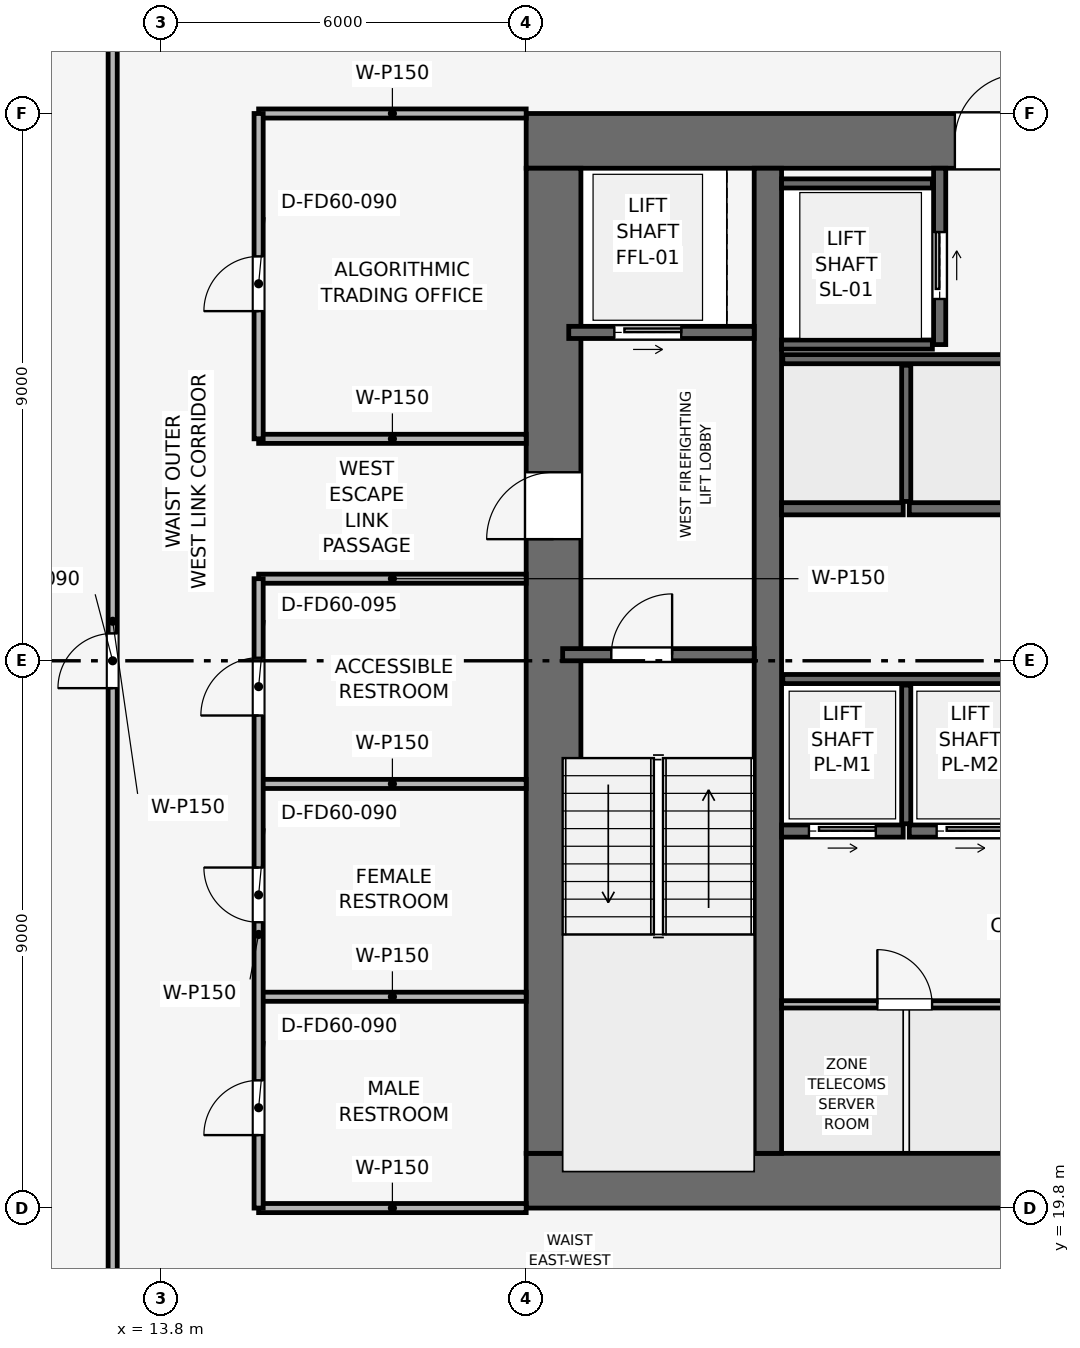
"""IFC4 building model, lengths in metres.
Left out: names, types, materials, properties, quantities, classifications, styles, units other than length and angle.
Written with IfcOpenShell. Run it as: python <this file> out.ifc"""

import sys

from ifc_helpers import new_model, si_unit, direction, frame, frame_2d, origin, place, context, subcontext, project, spatial, rectangle, extrude, element, fill, save


model = new_model("IFC4")
c1 = context("Model", 3, precision=1e-05, world=origin(), true_north=direction((0.0, 1.0)))
c2 = subcontext(c1, "Body", "Model", "MODEL_VIEW")
j1 = project(units=[si_unit("LENGTHUNIT", "METRE"), si_unit("PLANEANGLEUNIT", "RADIAN")], contexts=[c1])
p1 = place(None, origin())
s1 = spatial("IfcSite", under=j1, at=p1, CompositionType="ELEMENT")
p2 = place(p1, origin())
s2 = spatial("IfcBuilding", under=s1, at=p2, CompositionType="ELEMENT")
p3 = place(p2, frame((0.0, 0.0, 157.05)))
s3 = spatial("IfcBuildingStorey", under=s2, at=p3, CompositionType="ELEMENT", Elevation=157.05)
p4 = place(p3, frame((19.8, 20.25, 0.0), z_axis=(0.0, 0.0, 1.0), x_axis=(1.0, 0.0, 0.0)))
e1 = element("IfcWall", 1, at=p4, inside=s3, PredefinedType="SHEAR", context=c2, shape_type="SweptSolid", body=[
    extrude(rectangle(XDim=18.0, YDim=0.9, at=frame_2d((9.0, 0.0))), origin(), (0.0, 0.0, 1.0), 3.75),
])
p5 = place(p4, frame((8.4, 0.0, 0.0)))
e2 = element("IfcOpeningElement", 2, at=p5, cuts=e1, PredefinedType="OPENING", context=c2, shape_type="SweptSolid", body=[
    extrude(rectangle(XDim=1.2, YDim=2.2, at=frame_2d((0.6, 1.1))), frame((0.0, 0.46, 0.0), z_axis=(0.0, -1.0, 0.0), x_axis=(1.0, 0.0, 0.0)), (0.0, 0.0, 1.0), 0.92),
])
p6 = place(p3, frame((19.8, 37.35, 0.0), z_axis=(0.0, 0.0, 1.0), x_axis=(1.0, 0.0, 0.0)))
e3 = element("IfcWall", 3, at=p6, inside=s3, PredefinedType="SHEAR", context=c2, shape_type="SweptSolid", body=[
    extrude(rectangle(XDim=18.0, YDim=0.9, at=frame_2d((9.0, 0.0))), origin(), (0.0, 0.0, 1.0), 3.75),
])
p7 = place(p6, frame((7.05, 0.0, 0.0)))
e4 = element("IfcOpeningElement", 4, at=p7, cuts=e3, PredefinedType="OPENING", context=c2, shape_type="SweptSolid", body=[
    extrude(rectangle(XDim=1.1, YDim=2.15, at=frame_2d((0.55, 1.075))), frame((0.0, 0.46, 0.0), z_axis=(0.0, -1.0, 0.0), x_axis=(1.0, 0.0, 0.0)), (0.0, 0.0, 1.0), 0.92),
])
p8 = place(p3, frame((20.25, 20.7, 0.0), z_axis=(0.0, 0.0, 1.0), x_axis=(0.0, 1.0, 0.0)))
e5 = element("IfcWall", 5, at=p8, inside=s3, PredefinedType="SHEAR", context=c2, shape_type="SweptSolid", body=[
    extrude(rectangle(XDim=16.2, YDim=0.9, at=frame_2d((8.1, 0.0))), origin(), (0.0, 0.0, 1.0), 3.75),
])
p9 = place(p8, frame((10.1, 0.0, 0.0)))
e6 = element("IfcOpeningElement", 6, at=p9, cuts=e5, PredefinedType="OPENING", context=c2, shape_type="SweptSolid", body=[
    extrude(rectangle(XDim=1.1, YDim=2.15, at=frame_2d((0.55, 1.075))), frame((0.0, 0.46, 0.0), z_axis=(0.0, -1.0, 0.0), x_axis=(1.0, 0.0, 0.0)), (0.0, 0.0, 1.0), 0.92),
])
p10 = place(p3, frame((23.775, 20.7, 0.0), z_axis=(0.0, 0.0, 1.0), x_axis=(0.0, 1.0, 0.0)))
e7 = element("IfcWall", 7, at=p10, inside=s3, PredefinedType="SHEAR", context=c2, shape_type="SweptSolid", body=[
    extrude(rectangle(XDim=16.2, YDim=0.45, at=frame_2d((8.1, 0.0))), origin(), (0.0, 0.0, 1.0), 3.75),
])
p11 = place(p3, frame((20.4, 28.9, 0.0), z_axis=(0.0, 0.0, 1.0), x_axis=(1.0, 0.0, 0.0)))
e8 = element("IfcWall", 8, at=p11, inside=s3, PredefinedType="SHEAR", context=c2, shape_type="SweptSolid", body=[
    extrude(rectangle(XDim=3.15, YDim=0.2, at=frame_2d((1.575, 0.0))), origin(), (0.0, 0.0, 1.0), 3.495),
])
p12 = place(p11, frame((0.8, 0.0, 0.0)))
e9 = element("IfcOpeningElement", 9, at=p12, cuts=e8, PredefinedType="OPENING", context=c2, shape_type="SweptSolid", body=[
    extrude(rectangle(XDim=1.0, YDim=2.1, at=frame_2d((0.5, 1.05))), frame((0.0, 0.11, 0.0), z_axis=(0.0, -1.0, 0.0), x_axis=(1.0, 0.0, 0.0)), (0.0, 0.0, 1.0), 0.22),
])
p13 = place(p3, frame((20.5, 34.2, 0.0), z_axis=(0.0, 0.0, 1.0), x_axis=(1.0, 0.0, 0.0)))
e10 = element("IfcWall", 10, at=p13, inside=s3, PredefinedType="SHEAR", context=c2, shape_type="SweptSolid", body=[
    extrude(rectangle(XDim=3.05, YDim=0.2, at=frame_2d((1.525, 0.0))), origin(), (0.0, 0.0, 1.0), 3.495),
])
p14 = place(p13, frame((0.75, 0.0, 0.0)))
e11 = element("IfcOpeningElement", 11, at=p14, cuts=e10, PredefinedType="OPENING", context=c2, shape_type="SweptSolid", body=[
    extrude(rectangle(XDim=1.1, YDim=2.15, at=frame_2d((0.55, 1.075))), frame((0.0, 0.11, 0.0), z_axis=(0.0, -1.0, 0.0), x_axis=(1.0, 0.0, 0.0)), (0.0, 0.0, 1.0), 0.22),
])
p15 = place(p3, frame((26.6, 34.0, 0.0), z_axis=(0.0, 0.0, 1.0), x_axis=(0.0, 1.0, 0.0)))
e12 = element("IfcWall", 12, at=p15, inside=s3, PredefinedType="SHEAR", context=c2, shape_type="SweptSolid", body=[
    extrude(rectangle(XDim=2.9, YDim=0.2, at=frame_2d((1.45, 0.0))), origin(), (0.0, 0.0, 1.0), 3.495),
])
p16 = place(p15, frame((0.75, 0.0, 0.0)))
e13 = element("IfcOpeningElement", 13, at=p16, cuts=e12, PredefinedType="OPENING", context=c2, shape_type="SweptSolid", body=[
    extrude(rectangle(XDim=1.1, YDim=2.15, at=frame_2d((0.55, 1.075))), frame((0.0, 0.11, 0.0), z_axis=(0.0, -1.0, 0.0), x_axis=(1.0, 0.0, 0.0)), (0.0, 0.0, 1.0), 0.22),
])
for number, where, z_axis, x_axis in (
    (14, (24.0, 34.0, 0.0), (0.0, 0.0, 1.0), (1.0, 0.0, 0.0)),
    (15, (24.0, 36.65, 0.0), (0.0, 0.0, 1.0), (1.0, 0.0, 0.0)),
):
    element("IfcWall", number, at=place(p3, frame(where, z_axis=z_axis, x_axis=x_axis)), inside=s3, PredefinedType="SHEAR", context=c2, shape_type="SweptSolid", body=[
        extrude(rectangle(XDim=2.48, YDim=0.15, at=frame_2d((1.24, 0.0))), origin(), (0.0, 0.0, 1.0), 3.495),
    ])
p17 = place(p3, frame((24.0, 26.0, 0.0), z_axis=(0.0, 0.0, 1.0), x_axis=(1.0, 0.0, 0.0)))
e16 = element("IfcWall", 16, at=p17, inside=s3, PredefinedType="SHEAR", context=c2, shape_type="SweptSolid", body=[
    extrude(rectangle(XDim=2.0, YDim=0.2, at=frame_2d((1.0, 0.0))), origin(), (0.0, 0.0, 1.0), 3.495),
])
p18 = place(p17, frame((0.45, 0.0, 0.0)))
e17 = element("IfcOpeningElement", 17, at=p18, cuts=e16, PredefinedType="OPENING", context=c2, shape_type="SweptSolid", body=[
    extrude(rectangle(XDim=1.1, YDim=2.15, at=frame_2d((0.55, 1.075))), frame((0.0, 0.11, 0.0), z_axis=(0.0, -1.0, 0.0), x_axis=(1.0, 0.0, 0.0)), (0.0, 0.0, 1.0), 0.22),
])
p19 = place(p3, frame((26.1, 26.0, 0.0), z_axis=(0.0, 0.0, 1.0), x_axis=(1.0, 0.0, 0.0)))
e18 = element("IfcWall", 18, at=p19, inside=s3, PredefinedType="SHEAR", context=c2, shape_type="SweptSolid", body=[
    extrude(rectangle(XDim=2.0, YDim=0.2, at=frame_2d((1.0, 0.0))), origin(), (0.0, 0.0, 1.0), 3.495),
])
p20 = place(p19, frame((0.45, 0.0, 0.0)))
e19 = element("IfcOpeningElement", 19, at=p20, cuts=e18, PredefinedType="OPENING", context=c2, shape_type="SweptSolid", body=[
    extrude(rectangle(XDim=1.1, YDim=2.15, at=frame_2d((0.55, 1.075))), frame((0.0, 0.11, 0.0), z_axis=(0.0, -1.0, 0.0), x_axis=(1.0, 0.0, 0.0)), (0.0, 0.0, 1.0), 0.22),
])
for number, where, z_axis, x_axis in (
    (20, (24.0, 31.3, 0.0), (0.0, 0.0, 1.0), (1.0, 0.0, 0.0)),
    (21, (26.1, 31.3, 0.0), (0.0, 0.0, 1.0), (1.0, 0.0, 0.0)),
):
    element("IfcWall", number, at=place(p3, frame(where, z_axis=z_axis, x_axis=x_axis)), inside=s3, PredefinedType="SHEAR", context=c2, shape_type="SweptSolid", body=[
        extrude(rectangle(XDim=2.0, YDim=0.2, at=frame_2d((1.0, 0.0))), origin(), (0.0, 0.0, 1.0), 3.495),
    ])
p21 = place(p3, frame((24.02, 28.5, 0.0), z_axis=(0.0, 0.0, 1.0), x_axis=(1.0, 0.0, 0.0)))
e22 = element("IfcWall", 22, at=p21, inside=s3, PredefinedType="SHEAR", context=c2, shape_type="SweptSolid", body=[
    extrude(rectangle(XDim=4.08, YDim=0.15, at=frame_2d((2.04, 0.0))), origin(), (0.0, 0.0, 1.0), 3.495),
])
p22 = place(p3, frame((26.05, 26.12, 0.0), z_axis=(0.0, 0.0, 1.0), x_axis=(0.0, 1.0, 0.0)))
e23 = element("IfcWall", 23, at=p22, inside=s3, PredefinedType="SHEAR", context=c2, shape_type="SweptSolid", body=[
    extrude(rectangle(XDim=2.28, YDim=0.15, at=frame_2d((1.14, 0.0))), origin(), (0.0, 0.0, 1.0), 3.495),
])
p23 = place(p3, frame((24.02, 33.76, 0.0), z_axis=(0.0, 0.0, 1.0), x_axis=(1.0, 0.0, 0.0)))
e24 = element("IfcWall", 24, at=p23, inside=s3, PredefinedType="SHEAR", context=c2, shape_type="SweptSolid", body=[
    extrude(rectangle(XDim=4.08, YDim=0.15, at=frame_2d((2.04, 0.0))), origin(), (0.0, 0.0, 1.0), 3.495),
])
p24 = place(p3, frame((26.05, 31.42, 0.0), z_axis=(0.0, 0.0, 1.0), x_axis=(0.0, 1.0, 0.0)))
e25 = element("IfcWall", 25, at=p24, inside=s3, PredefinedType="SHEAR", context=c2, shape_type="SweptSolid", body=[
    extrude(rectangle(XDim=2.24, YDim=0.15, at=frame_2d((1.12, 0.0))), origin(), (0.0, 0.0, 1.0), 3.495),
])
p25 = place(p3, frame((24.0, 23.15, 0.0), z_axis=(0.0, 0.0, 1.0), x_axis=(1.0, 0.0, 0.0)))
e26 = element("IfcWall", 26, at=p25, inside=s3, PredefinedType="PARTITIONING", context=c2, shape_type="SweptSolid", body=[
    extrude(rectangle(XDim=4.05, YDim=0.12, at=frame_2d((2.025, 0.0))), origin(), (0.0, 0.0, 1.0), 3.495),
])
p26 = place(p25, frame((1.575, 0.0, 0.0)))
e27 = element("IfcOpeningElement", 27, at=p26, cuts=e26, PredefinedType="OPENING", context=c2, shape_type="SweptSolid", body=[
    extrude(rectangle(XDim=0.9, YDim=2.1, at=frame_2d((0.45, 1.05))), frame((0.0, 0.07, 0.0), z_axis=(0.0, -1.0, 0.0), x_axis=(1.0, 0.0, 0.0)), (0.0, 0.0, 1.0), 0.14),
])
p27 = place(p3, frame((15.4, 19.8, 0.0), z_axis=(0.0, 0.0, 1.0), x_axis=(1.0, 0.0, 0.0)))
e28 = element("IfcWall", 28, at=p27, inside=s3, PredefinedType="PARTITIONING", context=c2, shape_type="SweptSolid", body=[
    extrude(rectangle(XDim=4.4, YDim=0.15, at=frame_2d((2.2, 0.0))), origin(), (0.0, 0.0, 1.0), 3.03),
])
for number, where, z_axis, x_axis in (
    (29, (15.4, 23.275, 0.0), (0.0, 0.0, 1.0), (1.0, 0.0, 0.0)),
    (30, (15.4, 26.775, 0.0), (0.0, 0.0, 1.0), (1.0, 0.0, 0.0)),
    (31, (15.4, 30.15, 0.0), (0.0, 0.0, 1.0), (1.0, 0.0, 0.0)),
    (32, (15.4, 32.45, 0.0), (0.0, 0.0, 1.0), (1.0, 0.0, 0.0)),
):
    element("IfcWall", number, at=place(p3, frame(where, z_axis=z_axis, x_axis=x_axis)), inside=s3, PredefinedType="PARTITIONING", context=c2, shape_type="SweptSolid", body=[
        extrude(rectangle(XDim=4.4, YDim=0.15, at=frame_2d((2.2, 0.0))), origin(), (0.0, 0.0, 1.0), 3.495),
    ])
p28 = place(p3, frame((15.4, 37.8, 0.0), z_axis=(0.0, 0.0, 1.0), x_axis=(1.0, 0.0, 0.0)))
e33 = element("IfcWall", 33, at=p28, inside=s3, PredefinedType="PARTITIONING", context=c2, shape_type="SweptSolid", body=[
    extrude(rectangle(XDim=4.4, YDim=0.15, at=frame_2d((2.2, 0.0))), origin(), (0.0, 0.0, 1.0), 3.03),
])
p29 = place(p3, frame((15.4, 19.8, 0.0), z_axis=(0.0, 0.0, 1.0), x_axis=(0.0, 1.0, 0.0)))
e34 = element("IfcWall", 34, at=p29, inside=s3, PredefinedType="PARTITIONING", context=c2, shape_type="SweptSolid", body=[
    extrude(rectangle(XDim=10.35, YDim=0.15, at=frame_2d((5.175, 0.0))), origin(), (0.0, 0.0, 1.0), 3.03),
])
p30 = place(p29, frame((1.2, 0.0, 0.0)))
e35 = element("IfcOpeningElement", 35, at=p30, cuts=e34, PredefinedType="OPENING", context=c2, shape_type="SweptSolid", body=[
    extrude(rectangle(XDim=0.9, YDim=2.1, at=frame_2d((0.45, 1.05))), frame((0.0, 0.085, 0.0), z_axis=(0.0, -1.0, 0.0), x_axis=(1.0, 0.0, 0.0)), (0.0, 0.0, 1.0), 0.17),
])
p31 = place(p29, frame((4.7, 0.0, 0.0)))
e36 = element("IfcOpeningElement", 36, at=p31, cuts=e34, PredefinedType="OPENING", context=c2, shape_type="SweptSolid", body=[
    extrude(rectangle(XDim=0.9, YDim=2.1, at=frame_2d((0.45, 1.05))), frame((0.0, 0.085, 0.0), z_axis=(0.0, -1.0, 0.0), x_axis=(1.0, 0.0, 0.0)), (0.0, 0.0, 1.0), 0.17),
])
p32 = place(p29, frame((8.1, 0.0, 0.0)))
e37 = element("IfcOpeningElement", 37, at=p32, cuts=e34, PredefinedType="OPENING", context=c2, shape_type="SweptSolid", body=[
    extrude(rectangle(XDim=0.95, YDim=2.1, at=frame_2d((0.475, 1.05))), frame((0.0, 0.085, 0.0), z_axis=(0.0, -1.0, 0.0), x_axis=(1.0, 0.0, 0.0)), (0.0, 0.0, 1.0), 0.17),
])
p33 = place(p3, frame((15.4, 32.45, 0.0), z_axis=(0.0, 0.0, 1.0), x_axis=(0.0, 1.0, 0.0)))
e38 = element("IfcWall", 38, at=p33, inside=s3, PredefinedType="PARTITIONING", context=c2, shape_type="SweptSolid", body=[
    extrude(rectangle(XDim=5.35, YDim=0.15, at=frame_2d((2.675, 0.0))), origin(), (0.0, 0.0, 1.0), 3.03),
])
p34 = place(p33, frame((2.1, 0.0, 0.0)))
e39 = element("IfcOpeningElement", 39, at=p34, cuts=e38, PredefinedType="OPENING", context=c2, shape_type="SweptSolid", body=[
    extrude(rectangle(XDim=0.9, YDim=2.1, at=frame_2d((0.45, 1.05))), frame((0.0, 0.085, 0.0), z_axis=(0.0, -1.0, 0.0), x_axis=(1.0, 0.0, 0.0)), (0.0, 0.0, 1.0), 0.17),
])
p35 = place(p3, frame((13.0, 17.4, 0.0), z_axis=(0.0, 0.0, 1.0), x_axis=(0.0, 1.0, 0.0)))
e40 = element("IfcWall", 40, at=p35, inside=s3, PredefinedType="PARTITIONING", context=c2, shape_type="SweptSolid", body=[
    extrude(rectangle(XDim=22.8, YDim=0.15, at=frame_2d((11.4, 0.0))), origin(), (0.0, 0.0, 1.0), 3.03),
])
p36 = place(p35, frame((10.95, 0.0, 0.0)))
e41 = element("IfcOpeningElement", 41, at=p36, cuts=e40, PredefinedType="OPENING", context=c2, shape_type="SweptSolid", body=[
    extrude(rectangle(XDim=0.9, YDim=2.1, at=frame_2d((0.45, 1.05))), frame((0.0, 0.085, 0.0), z_axis=(0.0, -1.0, 0.0), x_axis=(1.0, 0.0, 0.0)), (0.0, 0.0, 1.0), 0.17),
])
p37 = place(p12, origin())
e42 = element("IfcDoor", 42, at=p37, inside=s3, OperationType="SINGLE_SWING_RIGHT", PredefinedType="DOOR", context=c2, shape_type="SweptSolid", body=[
    extrude(rectangle(XDim=1.0, YDim=2.1, at=frame_2d((0.5, 1.05))), frame((0.0, 0.025, 0.0), z_axis=(0.0, -1.0, 0.0), x_axis=(1.0, 0.0, 0.0)), (0.0, 0.0, 1.0), 0.05),
])
fill(e9, e42)
p38 = place(p14, origin())
e43 = element("IfcDoor", 43, at=p38, inside=s3, OperationType="SLIDING_TO_RIGHT", PredefinedType="DOOR", context=c2, shape_type="SweptSolid", body=[
    extrude(rectangle(XDim=1.1, YDim=2.15, at=frame_2d((0.55, 1.075))), frame((0.0, 0.025, 0.0), z_axis=(0.0, -1.0, 0.0), x_axis=(1.0, 0.0, 0.0)), (0.0, 0.0, 1.0), 0.05),
])
fill(e11, e43)
p39 = place(p16, origin())
e44 = element("IfcDoor", 44, at=p39, inside=s3, OperationType="SLIDING_TO_RIGHT", PredefinedType="DOOR", context=c2, shape_type="SweptSolid", body=[
    extrude(rectangle(XDim=1.1, YDim=2.15, at=frame_2d((0.55, 1.075))), frame((0.0, 0.025, 0.0), z_axis=(0.0, -1.0, 0.0), x_axis=(1.0, 0.0, 0.0)), (0.0, 0.0, 1.0), 0.05),
])
fill(e13, e44)
p40 = place(p18, origin())
e45 = element("IfcDoor", 45, at=p40, inside=s3, OperationType="SLIDING_TO_RIGHT", PredefinedType="DOOR", context=c2, shape_type="SweptSolid", body=[
    extrude(rectangle(XDim=1.1, YDim=2.15, at=frame_2d((0.55, 1.075))), frame((0.0, 0.025, 0.0), z_axis=(0.0, -1.0, 0.0), x_axis=(1.0, 0.0, 0.0)), (0.0, 0.0, 1.0), 0.05),
])
fill(e17, e45)
p41 = place(p20, origin())
e46 = element("IfcDoor", 46, at=p41, inside=s3, OperationType="SLIDING_TO_RIGHT", PredefinedType="DOOR", context=c2, shape_type="SweptSolid", body=[
    extrude(rectangle(XDim=1.1, YDim=2.15, at=frame_2d((0.55, 1.075))), frame((0.0, 0.025, 0.0), z_axis=(0.0, -1.0, 0.0), x_axis=(1.0, 0.0, 0.0)), (0.0, 0.0, 1.0), 0.05),
])
fill(e19, e46)
p42 = place(p26, origin())
e47 = element("IfcDoor", 47, at=p42, inside=s3, OperationType="SINGLE_SWING_LEFT", PredefinedType="DOOR", context=c2, shape_type="SweptSolid", body=[
    extrude(rectangle(XDim=0.9, YDim=2.1, at=frame_2d((0.45, 1.05))), frame((0.0, 0.025, 0.0), z_axis=(0.0, -1.0, 0.0), x_axis=(1.0, 0.0, 0.0)), (0.0, 0.0, 1.0), 0.05),
])
fill(e27, e47)
p43 = place(p30, origin())
e48 = element("IfcDoor", 48, at=p43, inside=s3, OperationType="SINGLE_SWING_LEFT", PredefinedType="DOOR", context=c2, shape_type="SweptSolid", body=[
    extrude(rectangle(XDim=0.9, YDim=2.1, at=frame_2d((0.45, 1.05))), frame((0.0, 0.025, 0.0), z_axis=(0.0, -1.0, 0.0), x_axis=(1.0, 0.0, 0.0)), (0.0, 0.0, 1.0), 0.05),
])
fill(e35, e48)
p44 = place(p31, origin())
e49 = element("IfcDoor", 49, at=p44, inside=s3, OperationType="SINGLE_SWING_RIGHT", PredefinedType="DOOR", context=c2, shape_type="SweptSolid", body=[
    extrude(rectangle(XDim=0.9, YDim=2.1, at=frame_2d((0.45, 1.05))), frame((0.0, 0.025, 0.0), z_axis=(0.0, -1.0, 0.0), x_axis=(1.0, 0.0, 0.0)), (0.0, 0.0, 1.0), 0.05),
])
fill(e36, e49)
p45 = place(p32, origin())
e50 = element("IfcDoor", 50, at=p45, inside=s3, OperationType="SINGLE_SWING_LEFT", PredefinedType="DOOR", context=c2, shape_type="SweptSolid", body=[
    extrude(rectangle(XDim=0.95, YDim=2.1, at=frame_2d((0.475, 1.05))), frame((0.0, 0.025, 0.0), z_axis=(0.0, -1.0, 0.0), x_axis=(1.0, 0.0, 0.0)), (0.0, 0.0, 1.0), 0.05),
])
fill(e37, e50)
p46 = place(p34, origin())
e51 = element("IfcDoor", 51, at=p46, inside=s3, OperationType="SINGLE_SWING_LEFT", PredefinedType="DOOR", context=c2, shape_type="SweptSolid", body=[
    extrude(rectangle(XDim=0.9, YDim=2.1, at=frame_2d((0.45, 1.05))), frame((0.0, 0.025, 0.0), z_axis=(0.0, -1.0, 0.0), x_axis=(1.0, 0.0, 0.0)), (0.0, 0.0, 1.0), 0.05),
])
fill(e39, e51)
p47 = place(p36, origin())
e52 = element("IfcDoor", 52, at=p47, inside=s3, OperationType="SINGLE_SWING_LEFT", PredefinedType="DOOR", context=c2, shape_type="SweptSolid", body=[
    extrude(rectangle(XDim=0.9, YDim=2.1, at=frame_2d((0.45, 1.05))), frame((0.0, 0.025, 0.0), z_axis=(0.0, -1.0, 0.0), x_axis=(1.0, 0.0, 0.0)), (0.0, 0.0, 1.0), 0.05),
])
fill(e41, e52)
p48 = place(p9, origin())
e53 = element("IfcDoor", 53, at=p48, inside=s3, OperationType="SINGLE_SWING_LEFT", PredefinedType="DOOR", context=c2, shape_type="SweptSolid", body=[
    extrude(rectangle(XDim=1.1, YDim=2.15, at=frame_2d((0.55, 1.075))), frame((0.0, 0.025, 0.0), z_axis=(0.0, -1.0, 0.0), x_axis=(1.0, 0.0, 0.0)), (0.0, 0.0, 1.0), 0.05),
])
fill(e6, e53)
p49 = place(p7, origin())
e54 = element("IfcDoor", 54, at=p49, inside=s3, OperationType="SINGLE_SWING_RIGHT", PredefinedType="DOOR", context=c2, shape_type="SweptSolid", body=[
    extrude(rectangle(XDim=1.1, YDim=2.15, at=frame_2d((0.55, 1.075))), frame((0.0, 0.025, 0.0), z_axis=(0.0, -1.0, 0.0), x_axis=(1.0, 0.0, 0.0)), (0.0, 0.0, 1.0), 0.05),
])
fill(e4, e54)
save(model, sys.argv[1])
